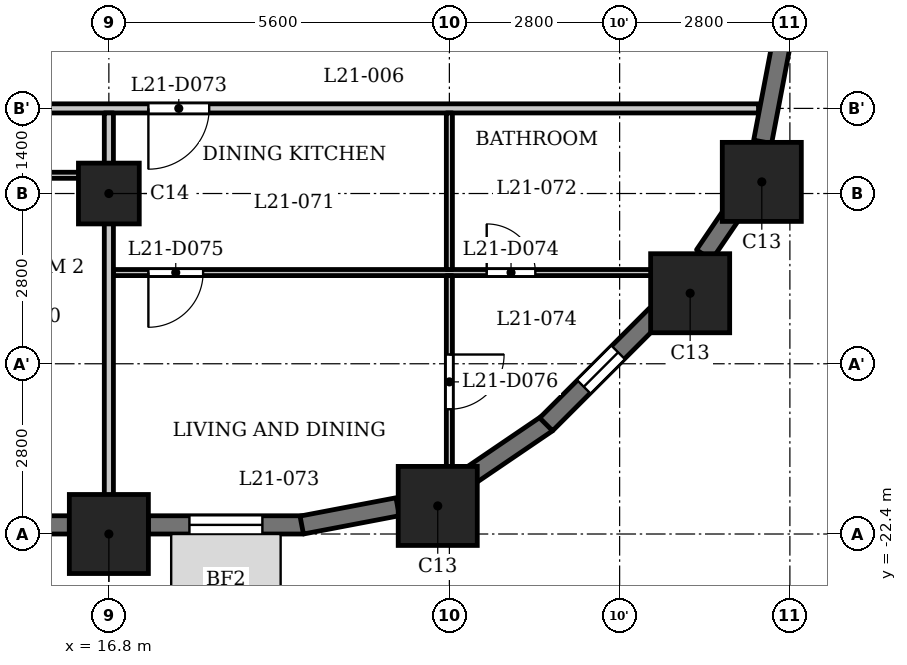
"""IFC4 building model, lengths in metres.
Left out: names, types, materials, properties, quantities, classifications, styles, units other than length and angle.
Written with IfcOpenShell. Run it as: python <this file> out.ifc"""

import sys

from ifc_helpers import new_model, si_unit, direction, frame, frame_2d, origin, origin_2d, place, context, subcontext, project, spatial, rectangle, extrude, element, fill, save


model = new_model("IFC4")
c1 = context("Model", 3, precision=1e-05, world=origin(), true_north=direction((0.0, 1.0)))
c2 = subcontext(c1, "Body", "Model", "MODEL_VIEW")
j1 = project(units=[si_unit("LENGTHUNIT", "METRE"), si_unit("PLANEANGLEUNIT", "RADIAN")], contexts=[c1])
p1 = place(None, origin())
s1 = spatial("IfcSite", under=j1, at=p1, CompositionType="ELEMENT")
p2 = place(p1, origin())
s2 = spatial("IfcBuilding", under=s1, at=p2, CompositionType="ELEMENT")
p3 = place(p2, frame((0.0, 0.0, 86.8)))
s3 = spatial("IfcBuildingStorey", under=s2, at=p3, CompositionType="ELEMENT", Elevation=86.8)
for number, where, z_axis, x_axis in (
    (1, (16.8, -22.4, 0.0), (0.0, 0.0, 1.0), (1.0, 0.0, 0.0)),
    (2, (22.209, -21.938, 0.0), (0.0, 0.0, 1.0), (1.0, 0.0, 0.0)),
    (3, (26.36, -18.44, 0.0), (0.0, 0.0, 1.0), (1.0, 0.0, 0.0)),
    (4, (27.538, -16.609, 0.0), (0.0, 0.0, 1.0), (1.0, 0.0, 0.0)),
):
    element("IfcColumn", number, at=place(p3, frame(where, z_axis=z_axis, x_axis=x_axis)), inside=s3, PredefinedType="COLUMN", context=c2, shape_type="SweptSolid", body=[
        extrude(rectangle(XDim=1.3, YDim=1.3, at=origin_2d()), origin(), (0.0, 0.0, 1.0), 3.5),
    ])
p4 = place(p3, frame((16.8, -16.8, 0.0), z_axis=(0.0, 0.0, 1.0), x_axis=(1.0, 0.0, 0.0)))
e5 = element("IfcColumn", 5, at=p4, inside=s3, PredefinedType="COLUMN", context=c2, shape_type="SweptSolid", body=[
    extrude(rectangle(XDim=1.0, YDim=1.0, at=origin_2d()), origin(), (0.0, 0.0, 1.0), 3.5),
])
p5 = place(p3, frame((11.85, -22.25, 0.0), z_axis=(0.0, 0.0, 1.0), x_axis=(1.0, 0.0, 0.0)))
e6 = element("IfcWall", 6, at=p5, inside=s3, PredefinedType="SOLIDWALL", context=c2, shape_type="SweptSolid", body=[
    extrude(rectangle(XDim=4.3, YDim=0.3, at=frame_2d((2.15, 0.0))), origin(), (0.0, 0.0, 1.0), 2.4),
])
p6 = place(p5, frame((0.337, 0.0, 0.6)))
e7 = element("IfcOpeningElement", 7, at=p6, cuts=e6, PredefinedType="OPENING", context=c2, shape_type="SweptSolid", body=[
    extrude(rectangle(XDim=1.2, YDim=1.55, at=frame_2d((0.6, 0.775))), frame((0.0, 0.16, 0.0), z_axis=(0.0, -1.0, 0.0), x_axis=(1.0, 0.0, 0.0)), (0.0, 0.0, 1.0), 0.32),
])
p7 = place(p5, frame((2.562, 0.0, 0.6)))
e8 = element("IfcOpeningElement", 8, at=p7, cuts=e6, PredefinedType="OPENING", context=c2, shape_type="SweptSolid", body=[
    extrude(rectangle(XDim=1.2, YDim=1.55, at=frame_2d((0.6, 0.775))), frame((0.0, 0.16, 0.0), z_axis=(0.0, -1.0, 0.0), x_axis=(1.0, 0.0, 0.0)), (0.0, 0.0, 1.0), 0.32),
])
p8 = place(p3, frame((17.45, -22.25, 0.0), z_axis=(0.0, 0.0, 1.0), x_axis=(1.0, 0.0, 0.0)))
e9 = element("IfcWall", 9, at=p8, inside=s3, PredefinedType="SOLIDWALL", context=c2, shape_type="SweptSolid", body=[
    extrude(rectangle(XDim=2.55, YDim=0.3, at=frame_2d((1.275, 0.0))), origin(), (0.0, 0.0, 1.0), 2.4),
])
p9 = place(p8, frame((0.675, 0.0, 0.6)))
e10 = element("IfcOpeningElement", 10, at=p9, cuts=e9, PredefinedType="OPENING", context=c2, shape_type="SweptSolid", body=[
    extrude(rectangle(XDim=1.2, YDim=1.55, at=frame_2d((0.6, 0.775))), frame((0.0, 0.16, 0.0), z_axis=(0.0, -1.0, 0.0), x_axis=(1.0, 0.0, 0.0)), (0.0, 0.0, 1.0), 0.32),
])
for number, where, z_axis, x_axis in (
    (11, (19.972, -22.253, 0.0), (0.0, 0.0, 1.0), (0.982, 0.187, 0.0)),
    (12, (22.684, -21.482, 0.0), (0.0, 0.0, 1.0), (0.827, 0.562, 0.0)),
):
    element("IfcWall", number, at=place(p3, frame(where, z_axis=z_axis, x_axis=x_axis)), inside=s3, PredefinedType="SOLIDWALL", context=c2, shape_type="SweptSolid", body=[
        extrude(rectangle(XDim=1.606, YDim=0.3, at=frame_2d((0.803, 0.0))), origin(), (0.0, 0.0, 1.0), 2.4),
    ])
p10 = place(p3, frame((23.991, -20.597, 0.0), z_axis=(0.0, 0.0, 1.0), x_axis=(0.707106781187, 0.707106781187, 0.0)))
e13 = element("IfcWall", 13, at=p10, inside=s3, PredefinedType="SOLIDWALL", context=c2, shape_type="SweptSolid", body=[
    extrude(rectangle(XDim=2.55, YDim=0.3, at=frame_2d((1.275, 0.0))), origin(), (0.0, 0.0, 1.0), 2.4),
])
p11 = place(p10, frame((0.875, 0.0, 0.6)))
e14 = element("IfcOpeningElement", 14, at=p11, cuts=e13, PredefinedType="OPENING", context=c2, shape_type="SweptSolid", body=[
    extrude(rectangle(XDim=0.8, YDim=1.55, at=frame_2d((0.4, 0.775))), frame((0.0, 0.16, 0.0), z_axis=(0.0, -1.0, 0.0), x_axis=(1.0, 0.0, 0.0)), (0.0, 0.0, 1.0), 0.32),
])
p12 = place(p3, frame((26.589, -17.81, 0.0), z_axis=(0.0, 0.0, 1.0), x_axis=(0.562066330934, 0.827092159091, 0.0)))
e15 = element("IfcWall", 15, at=p12, inside=s3, PredefinedType="SOLIDWALL", context=c2, shape_type="SweptSolid", body=[
    extrude(rectangle(XDim=0.877, YDim=0.3, at=frame_2d((0.438, 0.0))), origin(), (0.0, 0.0, 1.0), 3.2),
])
p13 = place(p3, frame((27.552, -15.949, 0.0), z_axis=(0.0, 0.0, 1.0), x_axis=(0.187279751651, 0.982306619453, 0.0)))
e16 = element("IfcWall", 16, at=p13, inside=s3, PredefinedType="SOLIDWALL", context=c2, shape_type="SweptSolid", body=[
    extrude(rectangle(XDim=1.606, YDim=0.3, at=frame_2d((0.803, 0.0))), origin(), (0.0, 0.0, 1.0), 2.4),
])
p14 = place(p3, frame((16.875, -18.1, 0.0), z_axis=(0.0, 0.0, 1.0), x_axis=(1.0, 0.0, 0.0)))
e17 = element("IfcWall", 17, at=p14, inside=s3, PredefinedType="PARTITIONING", context=c2, shape_type="SweptSolid", body=[
    extrude(rectangle(XDim=9.565, YDim=0.1, at=frame_2d((4.782, 0.0))), origin(), (0.0, 0.0, 1.0), 3.2),
])
p15 = place(p14, frame((6.139, 0.0, 0.0)))
e18 = element("IfcOpeningElement", 18, at=p15, cuts=e17, PredefinedType="OPENING", context=c2, shape_type="SweptSolid", body=[
    extrude(rectangle(XDim=0.8, YDim=2.1, at=frame_2d((0.4, 1.05))), frame((0.0, 0.06, 0.0), z_axis=(0.0, -1.0, 0.0), x_axis=(1.0, 0.0, 0.0)), (0.0, 0.0, 1.0), 0.12),
])
p16 = place(p14, frame((0.575, 0.0, 0.0)))
e19 = element("IfcOpeningElement", 19, at=p16, cuts=e17, PredefinedType="OPENING", context=c2, shape_type="SweptSolid", body=[
    extrude(rectangle(XDim=0.9, YDim=2.1, at=frame_2d((0.45, 1.05))), frame((0.0, 0.06, 0.0), z_axis=(0.0, -1.0, 0.0), x_axis=(1.0, 0.0, 0.0)), (0.0, 0.0, 1.0), 0.12),
])
p17 = place(p3, frame((-16.725, -16.5, 0.0), z_axis=(0.0, 0.0, 1.0), x_axis=(1.0, 0.0, 0.0)))
e20 = element("IfcWall", 20, at=p17, inside=s3, PredefinedType="PARTITIONING", context=c2, shape_type="SweptSolid", body=[
    extrude(rectangle(XDim=33.45, YDim=0.1, at=frame_2d((16.725, 0.0))), origin(), (0.0, 0.0, 1.0), 3.2),
])
p18 = place(p17, frame((3.825, 0.0, 0.0)))
e21 = element("IfcOpeningElement", 21, at=p18, cuts=e20, PredefinedType="OPENING", context=c2, shape_type="SweptSolid", body=[
    extrude(rectangle(XDim=0.8, YDim=2.1, at=frame_2d((0.4, 1.05))), frame((0.0, 0.06, 0.0), z_axis=(0.0, -1.0, 0.0), x_axis=(1.0, 0.0, 0.0)), (0.0, 0.0, 1.0), 0.12),
])
p19 = place(p17, frame((1.825, 0.0, 0.0)))
e22 = element("IfcOpeningElement", 22, at=p19, cuts=e20, PredefinedType="OPENING", context=c2, shape_type="SweptSolid", body=[
    extrude(rectangle(XDim=0.9, YDim=2.1, at=frame_2d((0.45, 1.05))), frame((0.0, 0.06, 0.0), z_axis=(0.0, -1.0, 0.0), x_axis=(1.0, 0.0, 0.0)), (0.0, 0.0, 1.0), 0.12),
])
p20 = place(p17, frame((9.675, 0.0, 0.0)))
e23 = element("IfcOpeningElement", 23, at=p20, cuts=e20, PredefinedType="OPENING", context=c2, shape_type="SweptSolid", body=[
    extrude(rectangle(XDim=0.8, YDim=2.1, at=frame_2d((0.4, 1.05))), frame((0.0, 0.06, 0.0), z_axis=(0.0, -1.0, 0.0), x_axis=(1.0, 0.0, 0.0)), (0.0, 0.0, 1.0), 0.12),
])
p21 = place(p17, frame((6.425, 0.0, 0.0)))
e24 = element("IfcOpeningElement", 24, at=p21, cuts=e20, PredefinedType="OPENING", context=c2, shape_type="SweptSolid", body=[
    extrude(rectangle(XDim=0.9, YDim=2.1, at=frame_2d((0.45, 1.05))), frame((0.0, 0.06, 0.0), z_axis=(0.0, -1.0, 0.0), x_axis=(1.0, 0.0, 0.0)), (0.0, 0.0, 1.0), 0.12),
])
p22 = place(p17, frame((15.275, 0.0, 0.0)))
e25 = element("IfcOpeningElement", 25, at=p22, cuts=e20, PredefinedType="OPENING", context=c2, shape_type="SweptSolid", body=[
    extrude(rectangle(XDim=0.8, YDim=2.1, at=frame_2d((0.4, 1.05))), frame((0.0, 0.06, 0.0), z_axis=(0.0, -1.0, 0.0), x_axis=(1.0, 0.0, 0.0)), (0.0, 0.0, 1.0), 0.12),
])
p23 = place(p17, frame((12.025, 0.0, 0.0)))
e26 = element("IfcOpeningElement", 26, at=p23, cuts=e20, PredefinedType="OPENING", context=c2, shape_type="SweptSolid", body=[
    extrude(rectangle(XDim=0.9, YDim=2.1, at=frame_2d((0.45, 1.05))), frame((0.0, 0.06, 0.0), z_axis=(0.0, -1.0, 0.0), x_axis=(1.0, 0.0, 0.0)), (0.0, 0.0, 1.0), 0.12),
])
p24 = place(p17, frame((20.875, 0.0, 0.0)))
e27 = element("IfcOpeningElement", 27, at=p24, cuts=e20, PredefinedType="OPENING", context=c2, shape_type="SweptSolid", body=[
    extrude(rectangle(XDim=0.8, YDim=2.1, at=frame_2d((0.4, 1.05))), frame((0.0, 0.06, 0.0), z_axis=(0.0, -1.0, 0.0), x_axis=(1.0, 0.0, 0.0)), (0.0, 0.0, 1.0), 0.12),
])
p25 = place(p17, frame((18.625, 0.0, 0.0)))
e28 = element("IfcOpeningElement", 28, at=p25, cuts=e20, PredefinedType="OPENING", context=c2, shape_type="SweptSolid", body=[
    extrude(rectangle(XDim=0.9, YDim=2.1, at=frame_2d((0.45, 1.05))), frame((0.0, 0.06, 0.0), z_axis=(0.0, -1.0, 0.0), x_axis=(1.0, 0.0, 0.0)), (0.0, 0.0, 1.0), 0.12),
])
p26 = place(p17, frame((23.875, 0.0, 0.0)))
e29 = element("IfcOpeningElement", 29, at=p26, cuts=e20, PredefinedType="OPENING", context=c2, shape_type="SweptSolid", body=[
    extrude(rectangle(XDim=0.8, YDim=2.1, at=frame_2d((0.4, 1.05))), frame((0.0, 0.06, 0.0), z_axis=(0.0, -1.0, 0.0), x_axis=(1.0, 0.0, 0.0)), (0.0, 0.0, 1.0), 0.12),
])
p27 = place(p17, frame((26.225, 0.0, 0.0)))
e30 = element("IfcOpeningElement", 30, at=p27, cuts=e20, PredefinedType="OPENING", context=c2, shape_type="SweptSolid", body=[
    extrude(rectangle(XDim=0.9, YDim=2.1, at=frame_2d((0.45, 1.05))), frame((0.0, 0.06, 0.0), z_axis=(0.0, -1.0, 0.0), x_axis=(1.0, 0.0, 0.0)), (0.0, 0.0, 1.0), 0.12),
])
p28 = place(p17, frame((28.575, 0.0, 0.0)))
e31 = element("IfcOpeningElement", 31, at=p28, cuts=e20, PredefinedType="OPENING", context=c2, shape_type="SweptSolid", body=[
    extrude(rectangle(XDim=0.9, YDim=2.1, at=frame_2d((0.45, 1.05))), frame((0.0, 0.06, 0.0), z_axis=(0.0, -1.0, 0.0), x_axis=(1.0, 0.0, 0.0)), (0.0, 0.0, 1.0), 0.12),
])
p29 = place(p17, frame((30.675, 0.0, 0.0)))
e32 = element("IfcOpeningElement", 32, at=p29, cuts=e20, PredefinedType="OPENING", context=c2, shape_type="SweptSolid", body=[
    extrude(rectangle(XDim=0.9, YDim=2.1, at=frame_2d((0.45, 1.05))), frame((0.0, 0.06, 0.0), z_axis=(0.0, -1.0, 0.0), x_axis=(1.0, 0.0, 0.0)), (0.0, 0.0, 1.0), 0.12),
])
p30 = place(p3, frame((14.925, -15.4, 0.0), z_axis=(0.0, 0.0, 1.0), x_axis=(1.0, 0.0, 0.0)))
e33 = element("IfcWall", 33, at=p30, inside=s3, PredefinedType="PARTITIONING", context=c2, shape_type="SweptSolid", body=[
    extrude(rectangle(XDim=12.559, YDim=0.15, at=frame_2d((6.279, 0.0))), origin(), (0.0, 0.0, 1.0), 3.2),
])
p31 = place(p30, frame((2.525, 0.0, 0.0)))
e34 = element("IfcOpeningElement", 34, at=p31, cuts=e33, PredefinedType="OPENING", context=c2, shape_type="SweptSolid", body=[
    extrude(rectangle(XDim=1.0, YDim=2.1, at=frame_2d((0.5, 1.05))), frame((0.0, 0.085, 0.0), z_axis=(0.0, -1.0, 0.0), x_axis=(1.0, 0.0, 0.0)), (0.0, 0.0, 1.0), 0.17),
])
p32 = place(p3, frame((16.8, -23.03, 0.0), z_axis=(0.0, 0.0, 1.0), x_axis=(0.0, 1.0, 0.0)))
e35 = element("IfcWall", 35, at=p32, inside=s3, PredefinedType="PARTITIONING", context=c2, shape_type="SweptSolid", body=[
    extrude(rectangle(XDim=7.555, YDim=0.15, at=frame_2d((3.777, 0.0))), origin(), (0.0, 0.0, 1.0), 3.2),
])
p33 = place(p3, frame((22.4, -21.72, 0.0), z_axis=(0.0, 0.0, 1.0), x_axis=(0.0, 1.0, 0.0)))
e36 = element("IfcWall", 36, at=p33, inside=s3, PredefinedType="PARTITIONING", context=c2, shape_type="SweptSolid", body=[
    extrude(rectangle(XDim=3.57, YDim=0.1, at=frame_2d((1.785, 0.0))), origin(), (0.0, 0.0, 1.0), 3.2),
])
p34 = place(p33, frame((1.372, 0.0, 0.0)))
e37 = element("IfcOpeningElement", 37, at=p34, cuts=e36, PredefinedType="OPENING", context=c2, shape_type="SweptSolid", body=[
    extrude(rectangle(XDim=0.9, YDim=2.1, at=frame_2d((0.45, 1.05))), frame((0.0, 0.06, 0.0), z_axis=(0.0, -1.0, 0.0), x_axis=(1.0, 0.0, 0.0)), (0.0, 0.0, 1.0), 0.12),
])
p35 = place(p3, frame((22.4, -18.05, 0.0), z_axis=(0.0, 0.0, 1.0), x_axis=(0.0, 1.0, 0.0)))
e38 = element("IfcWall", 38, at=p35, inside=s3, PredefinedType="PARTITIONING", context=c2, shape_type="SweptSolid", body=[
    extrude(rectangle(XDim=2.575, YDim=0.1, at=frame_2d((1.288, 0.0))), origin(), (0.0, 0.0, 1.0), 3.2),
])
p36 = place(p31, origin())
e39 = element("IfcDoor", 39, at=p36, inside=s3, OperationType="SINGLE_SWING_LEFT", PredefinedType="DOOR", context=c2, shape_type="SweptSolid", body=[
    extrude(rectangle(XDim=1.0, YDim=2.1, at=frame_2d((0.5, 1.05))), frame((0.0, 0.025, 0.0), z_axis=(0.0, -1.0, 0.0), x_axis=(1.0, 0.0, 0.0)), (0.0, 0.0, 1.0), 0.05),
])
fill(e34, e39)
p37 = place(p15, origin())
e40 = element("IfcDoor", 40, at=p37, inside=s3, OperationType="SINGLE_SWING_RIGHT", PredefinedType="DOOR", context=c2, shape_type="SweptSolid", body=[
    extrude(rectangle(XDim=0.8, YDim=2.1, at=frame_2d((0.4, 1.05))), frame((0.0, 0.025, 0.0), z_axis=(0.0, -1.0, 0.0), x_axis=(1.0, 0.0, 0.0)), (0.0, 0.0, 1.0), 0.05),
])
fill(e18, e40)
p38 = place(p16, origin())
e41 = element("IfcDoor", 41, at=p38, inside=s3, OperationType="SINGLE_SWING_LEFT", PredefinedType="DOOR", context=c2, shape_type="SweptSolid", body=[
    extrude(rectangle(XDim=0.9, YDim=2.1, at=frame_2d((0.45, 1.05))), frame((0.0, 0.025, 0.0), z_axis=(0.0, -1.0, 0.0), x_axis=(1.0, 0.0, 0.0)), (0.0, 0.0, 1.0), 0.05),
])
fill(e19, e41)
p39 = place(p34, origin())
e42 = element("IfcDoor", 42, at=p39, inside=s3, OperationType="SINGLE_SWING_RIGHT", PredefinedType="DOOR", context=c2, shape_type="SweptSolid", body=[
    extrude(rectangle(XDim=0.9, YDim=2.1, at=frame_2d((0.45, 1.05))), frame((0.0, 0.025, 0.0), z_axis=(0.0, -1.0, 0.0), x_axis=(1.0, 0.0, 0.0)), (0.0, 0.0, 1.0), 0.05),
])
fill(e37, e42)
p40 = place(p9, origin())
e43 = element("IfcWindow", 43, at=p40, inside=s3, PartitioningType="SINGLE_PANEL", PredefinedType="WINDOW", context=c2, shape_type="SweptSolid", body=[
    extrude(rectangle(XDim=1.2, YDim=1.55, at=frame_2d((0.6, 0.775))), frame((0.0, 0.03, 0.0), z_axis=(0.0, -1.0, 0.0), x_axis=(1.0, 0.0, 0.0)), (0.0, 0.0, 1.0), 0.06),
])
fill(e10, e43)
p41 = place(p11, origin())
e44 = element("IfcWindow", 44, at=p41, inside=s3, PartitioningType="SINGLE_PANEL", PredefinedType="WINDOW", context=c2, shape_type="SweptSolid", body=[
    extrude(rectangle(XDim=0.8, YDim=1.55, at=frame_2d((0.4, 0.775))), frame((0.0, 0.03, 0.0), z_axis=(0.0, -1.0, 0.0), x_axis=(1.0, 0.0, 0.0)), (0.0, 0.0, 1.0), 0.06),
])
fill(e14, e44)
save(model, sys.argv[1])
